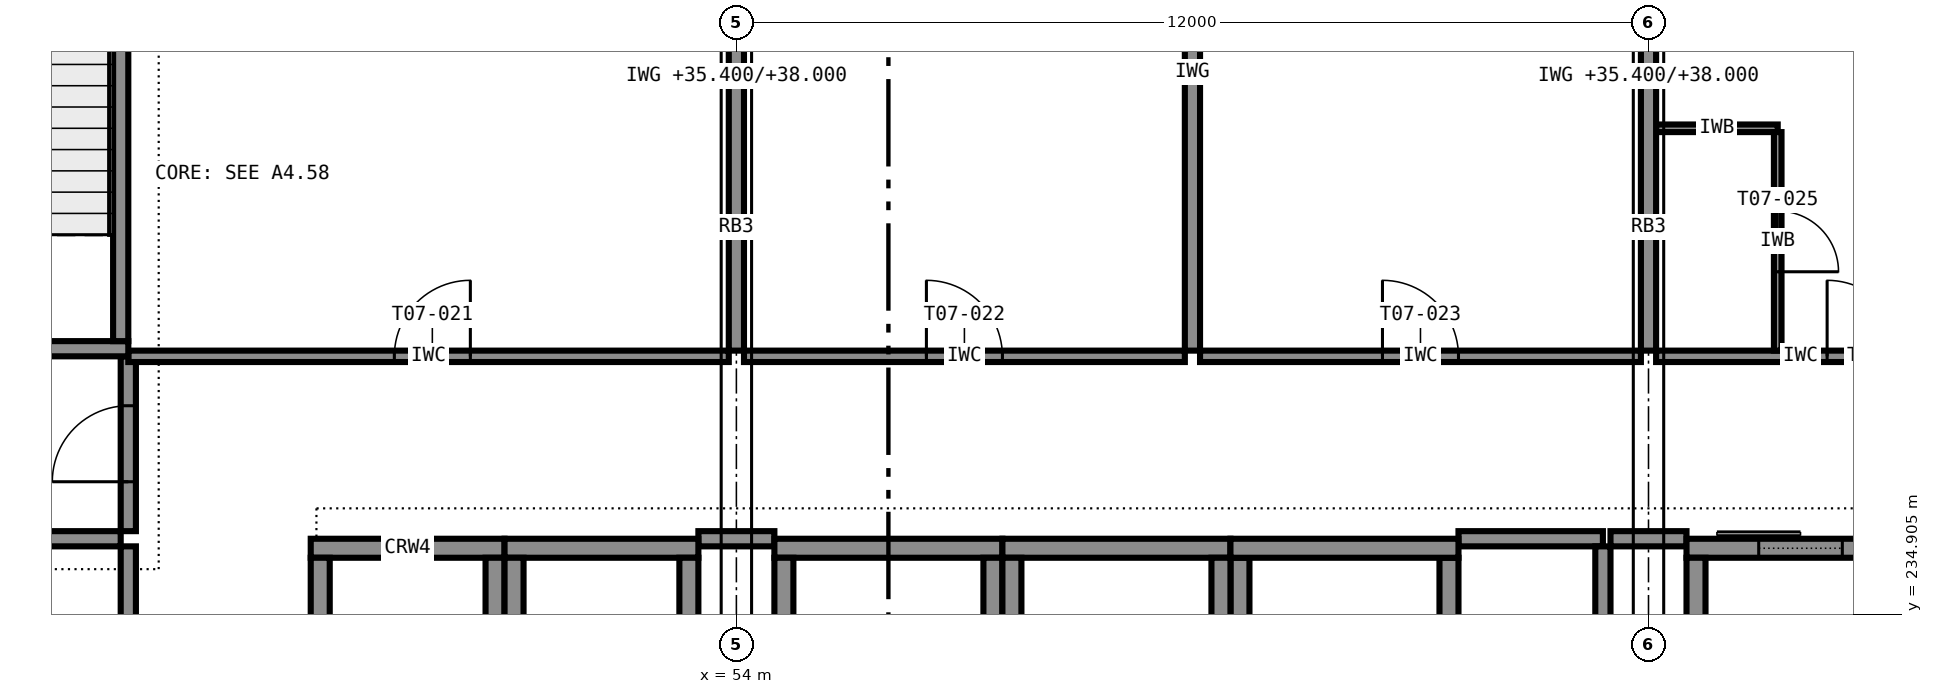
"""IFC4 building model, lengths in metres.
Left out: names, types, materials, properties, quantities, classifications, styles, units other than length and angle.
Written with IfcOpenShell. Run it as: python <this file> out.ifc"""

import sys

from ifc_helpers import new_model, si_unit, direction, frame, frame_2d, origin, place, context, subcontext, project, spatial, rectangle, extrude, element, fill, save


model = new_model("IFC4")
c1 = context("Model", 3, precision=1e-05, world=origin(), true_north=direction((0.0, 1.0)))
c2 = subcontext(c1, "Body", "Model", "MODEL_VIEW")
j1 = project(units=[si_unit("LENGTHUNIT", "METRE"), si_unit("PLANEANGLEUNIT", "RADIAN")], contexts=[c1])
p1 = place(None, origin())
s1 = spatial("IfcSite", under=j1, at=p1, CompositionType="ELEMENT")
p2 = place(p1, origin())
s2 = spatial("IfcBuilding", under=s1, at=p2, CompositionType="ELEMENT")
p3 = place(p2, frame((0.0, 0.0, 35.4)))
s3 = spatial("IfcBuildingStorey", under=s2, at=p3, CompositionType="ELEMENT", Elevation=35.4)
p4 = place(p3, frame((54.5, 235.775, 0.0), z_axis=(0.0, 0.0, 1.0), x_axis=(1.0, 0.0, 0.0)))
e1 = element("IfcWall", 1, at=p4, inside=s3, PredefinedType="SHEAR", context=c2, shape_type="SweptSolid", body=[
    extrude(rectangle(XDim=3.0, YDim=0.25, at=frame_2d((1.5, 0.0))), origin(), (0.0, 0.0, 1.0), 3.6),
])
for number, where, z_axis, x_axis in (
    (2, (54.625, 232.35, 0.0), (0.0, 0.0, 1.0), (0.0, 1.0, 0.0)),
    (3, (57.375, 232.35, 0.0), (0.0, 0.0, 1.0), (0.0, 1.0, 0.0)),
):
    element("IfcWall", number, at=place(p3, frame(where, z_axis=z_axis, x_axis=x_axis)), inside=s3, PredefinedType="SHEAR", context=c2, shape_type="SweptSolid", body=[
        extrude(rectangle(XDim=3.3, YDim=0.25, at=frame_2d((1.65, 0.0))), origin(), (0.0, 0.0, 1.0), 3.6),
    ])
p5 = place(p3, frame((57.5, 235.775, 0.0), z_axis=(0.0, 0.0, 1.0), x_axis=(1.0, 0.0, 0.0)))
e4 = element("IfcWall", 4, at=p5, inside=s3, PredefinedType="SHEAR", context=c2, shape_type="SweptSolid", body=[
    extrude(rectangle(XDim=3.0, YDim=0.25, at=frame_2d((1.5, 0.0))), origin(), (0.0, 0.0, 1.0), 3.6),
])
for number, where, z_axis, x_axis in (
    (5, (57.625, 232.35, 0.0), (0.0, 0.0, 1.0), (0.0, 1.0, 0.0)),
    (6, (60.375, 232.35, 0.0), (0.0, 0.0, 1.0), (0.0, 1.0, 0.0)),
):
    element("IfcWall", number, at=place(p3, frame(where, z_axis=z_axis, x_axis=x_axis)), inside=s3, PredefinedType="SHEAR", context=c2, shape_type="SweptSolid", body=[
        extrude(rectangle(XDim=3.3, YDim=0.25, at=frame_2d((1.65, 0.0))), origin(), (0.0, 0.0, 1.0), 3.6),
    ])
p6 = place(p3, frame((60.5, 235.775, 0.0), z_axis=(0.0, 0.0, 1.0), x_axis=(1.0, 0.0, 0.0)))
e7 = element("IfcWall", 7, at=p6, inside=s3, PredefinedType="SHEAR", context=c2, shape_type="SweptSolid", body=[
    extrude(rectangle(XDim=3.0, YDim=0.25, at=frame_2d((1.5, 0.0))), origin(), (0.0, 0.0, 1.0), 3.6),
])
for number, where, z_axis, x_axis in (
    (8, (60.625, 232.35, 0.0), (0.0, 0.0, 1.0), (0.0, 1.0, 0.0)),
    (9, (63.375, 232.35, 0.0), (0.0, 0.0, 1.0), (0.0, 1.0, 0.0)),
):
    element("IfcWall", number, at=place(p3, frame(where, z_axis=z_axis, x_axis=x_axis)), inside=s3, PredefinedType="SHEAR", context=c2, shape_type="SweptSolid", body=[
        extrude(rectangle(XDim=3.3, YDim=0.25, at=frame_2d((1.65, 0.0))), origin(), (0.0, 0.0, 1.0), 3.6),
    ])
p7 = place(p3, frame((66.5, 235.775, 0.0), z_axis=(0.0, 0.0, 1.0), x_axis=(1.0, 0.0, 0.0)))
e10 = element("IfcWall", 10, at=p7, inside=s3, PredefinedType="SHEAR", context=c2, shape_type="SweptSolid", body=[
    extrude(rectangle(XDim=3.0, YDim=0.25, at=frame_2d((1.5, 0.0))), origin(), (0.0, 0.0, 1.0), 3.6),
])
p8 = place(p7, frame((0.95, 0.0, 0.0)))
e11 = element("IfcOpeningElement", 11, at=p8, cuts=e10, PredefinedType="OPENING", context=c2, shape_type="SweptSolid", body=[
    extrude(rectangle(XDim=1.1, YDim=2.1, at=frame_2d((0.55, 1.05))), frame((0.0, 0.135, 0.0), z_axis=(0.0, -1.0, 0.0), x_axis=(1.0, 0.0, 0.0)), (0.0, 0.0, 1.0), 0.27),
])
p9 = place(p3, frame((66.625, 232.35, 0.0), z_axis=(0.0, 0.0, 1.0), x_axis=(0.0, 1.0, 0.0)))
e12 = element("IfcWall", 12, at=p9, inside=s3, PredefinedType="SHEAR", context=c2, shape_type="SweptSolid", body=[
    extrude(rectangle(XDim=3.3, YDim=0.25, at=frame_2d((1.65, 0.0))), origin(), (0.0, 0.0, 1.0), 3.6),
])
p10 = place(p3, frame((48.4, 235.775, 0.0), z_axis=(0.0, 0.0, 1.0), x_axis=(1.0, 0.0, 0.0)))
e13 = element("IfcWall", 13, at=p10, inside=s3, PredefinedType="SHEAR", context=c2, shape_type="SweptSolid", body=[
    extrude(rectangle(XDim=2.55, YDim=0.25, at=frame_2d((1.275, 0.0))), origin(), (0.0, 0.0, 1.0), 3.6),
])
for number, where, z_axis, x_axis in (
    (14, (48.525, 232.35, 0.0), (0.0, 0.0, 1.0), (0.0, 1.0, 0.0)),
    (15, (50.825, 232.35, 0.0), (0.0, 0.0, 1.0), (0.0, 1.0, 0.0)),
):
    element("IfcWall", number, at=place(p3, frame(where, z_axis=z_axis, x_axis=x_axis)), inside=s3, PredefinedType="SHEAR", context=c2, shape_type="SweptSolid", body=[
        extrude(rectangle(XDim=3.3, YDim=0.25, at=frame_2d((1.65, 0.0))), origin(), (0.0, 0.0, 1.0), 3.6),
    ])
p11 = place(p3, frame((50.95, 235.775, 0.0), z_axis=(0.0, 0.0, 1.0), x_axis=(1.0, 0.0, 0.0)))
e16 = element("IfcWall", 16, at=p11, inside=s3, PredefinedType="SHEAR", context=c2, shape_type="SweptSolid", body=[
    extrude(rectangle(XDim=2.55, YDim=0.25, at=frame_2d((1.275, 0.0))), origin(), (0.0, 0.0, 1.0), 3.6),
])
for number, where, z_axis, x_axis in (
    (17, (51.075, 232.35, 0.0), (0.0, 0.0, 1.0), (0.0, 1.0, 0.0)),
    (18, (53.375, 232.35, 0.0), (0.0, 0.0, 1.0), (0.0, 1.0, 0.0)),
):
    element("IfcWall", number, at=place(p3, frame(where, z_axis=z_axis, x_axis=x_axis)), inside=s3, PredefinedType="SHEAR", context=c2, shape_type="SweptSolid", body=[
        extrude(rectangle(XDim=3.3, YDim=0.25, at=frame_2d((1.65, 0.0))), origin(), (0.0, 0.0, 1.0), 3.6),
    ])
p12 = place(p3, frame((42.5, 238.4, 0.0), z_axis=(0.0, 0.0, 1.0), x_axis=(1.0, 0.0, 0.0)))
e19 = element("IfcWall", 19, at=p12, inside=s3, PredefinedType="SHEAR", context=c2, shape_type="SweptSolid", body=[
    extrude(rectangle(XDim=3.5, YDim=0.2, at=frame_2d((1.75, 0.0))), origin(), (0.0, 0.0, 1.0), 3.6),
])
p13 = place(p12, frame((1.15, 0.0, 0.0)))
e20 = element("IfcOpeningElement", 20, at=p13, cuts=e19, PredefinedType="OPENING", context=c2, shape_type="SweptSolid", body=[
    extrude(rectangle(XDim=1.2, YDim=2.1, at=frame_2d((0.6, 1.05))), frame((0.0, 0.11, 0.0), z_axis=(0.0, -1.0, 0.0), x_axis=(1.0, 0.0, 0.0)), (0.0, 0.0, 1.0), 0.22),
])
p14 = place(p3, frame((45.9, 238.5, 0.0), z_axis=(0.0, 0.0, 1.0), x_axis=(0.0, 1.0, 0.0)))
e21 = element("IfcWall", 21, at=p14, inside=s3, PredefinedType="SHEAR", context=c2, shape_type="SweptSolid", body=[
    extrude(rectangle(XDim=7.0, YDim=0.2, at=frame_2d((3.5, 0.0))), origin(), (0.0, 0.0, 1.0), 3.6),
])
p15 = place(p3, frame((42.3, 235.9, 0.0), z_axis=(0.0, 0.0, 1.0), x_axis=(1.0, 0.0, 0.0)))
e22 = element("IfcWall", 22, at=p15, inside=s3, PredefinedType="PARTITIONING", context=c2, shape_type="SweptSolid", body=[
    extrude(rectangle(XDim=3.6, YDim=0.2, at=frame_2d((1.8, 0.0))), origin(), (0.0, 0.0, 1.0), 3.4),
])
p16 = place(p3, frame((53.5, 235.9, 0.0), z_axis=(0.0, 0.0, 1.0), x_axis=(1.0, 0.0, 0.0)))
e23 = element("IfcWall", 23, at=p16, inside=s3, PredefinedType="PARTITIONING", context=c2, shape_type="SweptSolid", body=[
    extrude(rectangle(XDim=1.0, YDim=0.2, at=frame_2d((0.5, 0.0))), origin(), (0.0, 0.0, 1.0), 3.4),
])
p17 = place(p3, frame((63.5, 235.9, 0.0), z_axis=(0.0, 0.0, 1.0), x_axis=(1.0, 0.0, 0.0)))
e24 = element("IfcWall", 24, at=p17, inside=s3, PredefinedType="PARTITIONING", context=c2, shape_type="SweptSolid", body=[
    extrude(rectangle(XDim=1.9, YDim=0.2, at=frame_2d((0.95, 0.0))), origin(), (0.0, 0.0, 1.0), 3.4),
])
p18 = place(p3, frame((65.5, 235.9, 0.0), z_axis=(0.0, 0.0, 1.0), x_axis=(1.0, 0.0, 0.0)))
e25 = element("IfcWall", 25, at=p18, inside=s3, PredefinedType="PARTITIONING", context=c2, shape_type="SweptSolid", body=[
    extrude(rectangle(XDim=1.0, YDim=0.2, at=frame_2d((0.5, 0.0))), origin(), (0.0, 0.0, 1.0), 3.4),
])
p19 = place(p3, frame((46.0, 232.2, 0.0), z_axis=(0.0, 0.0, 1.0), x_axis=(0.0, 1.0, 0.0)))
e26 = element("IfcWall", 26, at=p19, inside=s3, PredefinedType="PARTITIONING", context=c2, shape_type="SweptSolid", body=[
    extrude(rectangle(XDim=3.6, YDim=0.2, at=frame_2d((1.8, 0.0))), origin(), (0.0, 0.0, 1.0), 3.4),
])
p20 = place(p19, frame((1.35, 0.0, 0.0)))
e27 = element("IfcOpeningElement", 27, at=p20, cuts=e26, PredefinedType="OPENING", context=c2, shape_type="SweptSolid", body=[
    extrude(rectangle(XDim=0.9, YDim=2.1, at=frame_2d((0.45, 1.05))), frame((0.0, 0.11, 0.0), z_axis=(0.0, -1.0, 0.0), x_axis=(1.0, 0.0, 0.0)), (0.0, 0.0, 1.0), 0.22),
])
p21 = place(p3, frame((46.0, 236.0, 0.0), z_axis=(0.0, 0.0, 1.0), x_axis=(0.0, 1.0, 0.0)))
e28 = element("IfcWall", 28, at=p21, inside=s3, PredefinedType="PARTITIONING", context=c2, shape_type="SweptSolid", body=[
    extrude(rectangle(XDim=2.3, YDim=0.2, at=frame_2d((1.15, 0.0))), origin(), (0.0, 0.0, 1.0), 3.4),
])
p22 = place(p21, frame((0.65, 0.0, 0.0)))
e29 = element("IfcOpeningElement", 29, at=p22, cuts=e28, PredefinedType="OPENING", context=c2, shape_type="SweptSolid", body=[
    extrude(rectangle(XDim=1.0, YDim=2.1, at=frame_2d((0.5, 1.05))), frame((0.0, 0.11, 0.0), z_axis=(0.0, -1.0, 0.0), x_axis=(1.0, 0.0, 0.0)), (0.0, 0.0, 1.0), 0.22),
])
p23 = place(p3, frame((65.4, 232.2, 0.0), z_axis=(0.0, 0.0, 1.0), x_axis=(0.0, 1.0, 0.0)))
e30 = element("IfcWall", 30, at=p23, inside=s3, PredefinedType="PARTITIONING", context=c2, shape_type="SweptSolid", body=[
    extrude(rectangle(XDim=3.6, YDim=0.2, at=frame_2d((1.8, 0.0))), origin(), (0.0, 0.0, 1.0), 3.4),
])
p24 = place(p3, frame((46.0, 238.3, 0.0), z_axis=(0.0, 0.0, 1.0), x_axis=(1.0, 0.0, 0.0)))
e31 = element("IfcWall", 31, at=p24, inside=s3, PredefinedType="PARTITIONING", context=c2, shape_type="SweptSolid", body=[
    extrude(rectangle(XDim=7.9, YDim=0.15, at=frame_2d((3.95, 0.0))), origin(), (0.0, 0.0, 1.0), 3.4),
])
p25 = place(p24, frame((3.5, 0.0, 0.0)))
e32 = element("IfcOpeningElement", 32, at=p25, cuts=e31, PredefinedType="OPENING", context=c2, shape_type="SweptSolid", body=[
    extrude(rectangle(XDim=1.0, YDim=2.1, at=frame_2d((0.5, 1.05))), frame((0.0, 0.085, 0.0), z_axis=(0.0, -1.0, 0.0), x_axis=(1.0, 0.0, 0.0)), (0.0, 0.0, 1.0), 0.17),
])
p26 = place(p3, frame((54.1, 238.3, 0.0), z_axis=(0.0, 0.0, 1.0), x_axis=(1.0, 0.0, 0.0)))
e33 = element("IfcWall", 33, at=p26, inside=s3, PredefinedType="PARTITIONING", context=c2, shape_type="SweptSolid", body=[
    extrude(rectangle(XDim=5.8, YDim=0.15, at=frame_2d((2.9, 0.0))), origin(), (0.0, 0.0, 1.0), 3.4),
])
p27 = place(p26, frame((2.4, 0.0, 0.0)))
e34 = element("IfcOpeningElement", 34, at=p27, cuts=e33, PredefinedType="OPENING", context=c2, shape_type="SweptSolid", body=[
    extrude(rectangle(XDim=1.0, YDim=2.1, at=frame_2d((0.5, 1.05))), frame((0.0, 0.085, 0.0), z_axis=(0.0, -1.0, 0.0), x_axis=(1.0, 0.0, 0.0)), (0.0, 0.0, 1.0), 0.17),
])
p28 = place(p3, frame((60.1, 238.3, 0.0), z_axis=(0.0, 0.0, 1.0), x_axis=(1.0, 0.0, 0.0)))
e35 = element("IfcWall", 35, at=p28, inside=s3, PredefinedType="PARTITIONING", context=c2, shape_type="SweptSolid", body=[
    extrude(rectangle(XDim=5.8, YDim=0.15, at=frame_2d((2.9, 0.0))), origin(), (0.0, 0.0, 1.0), 3.4),
])
p29 = place(p28, frame((2.4, 0.0, 0.0)))
e36 = element("IfcOpeningElement", 36, at=p29, cuts=e35, PredefinedType="OPENING", context=c2, shape_type="SweptSolid", body=[
    extrude(rectangle(XDim=1.0, YDim=2.1, at=frame_2d((0.5, 1.05))), frame((0.0, 0.085, 0.0), z_axis=(0.0, -1.0, 0.0), x_axis=(1.0, 0.0, 0.0)), (0.0, 0.0, 1.0), 0.17),
])
p30 = place(p3, frame((66.1, 238.3, 0.0), z_axis=(0.0, 0.0, 1.0), x_axis=(1.0, 0.0, 0.0)))
e37 = element("IfcWall", 37, at=p30, inside=s3, PredefinedType="PARTITIONING", context=c2, shape_type="SweptSolid", body=[
    extrude(rectangle(XDim=3.8, YDim=0.15, at=frame_2d((1.9, 0.0))), origin(), (0.0, 0.0, 1.0), 3.4),
])
p31 = place(p30, frame((2.25, 0.0, 0.0)))
e38 = element("IfcOpeningElement", 38, at=p31, cuts=e37, PredefinedType="OPENING", context=c2, shape_type="SweptSolid", body=[
    extrude(rectangle(XDim=1.0, YDim=2.1, at=frame_2d((0.5, 1.05))), frame((0.0, 0.085, 0.0), z_axis=(0.0, -1.0, 0.0), x_axis=(1.0, 0.0, 0.0)), (0.0, 0.0, 1.0), 0.17),
])
p32 = place(p3, frame((66.1, 241.3, 0.0), z_axis=(0.0, 0.0, 1.0), x_axis=(1.0, 0.0, 0.0)))
e39 = element("IfcWall", 39, at=p32, inside=s3, PredefinedType="PARTITIONING", context=c2, shape_type="SweptSolid", body=[
    extrude(rectangle(XDim=1.6, YDim=0.1, at=frame_2d((0.8, 0.0))), origin(), (0.0, 0.0, 1.0), 3.4),
])
p33 = place(p3, frame((67.7, 241.25, 0.0), z_axis=(0.0, 0.0, 1.0), x_axis=(0.0, -1.0, 0.0)))
e40 = element("IfcWall", 40, at=p33, inside=s3, PredefinedType="PARTITIONING", context=c2, shape_type="SweptSolid", body=[
    extrude(rectangle(XDim=2.875, YDim=0.1, at=frame_2d((1.438, 0.0))), origin(), (0.0, 0.0, 1.0), 3.4),
])
p34 = place(p33, frame((1.038, 0.0, 0.0)))
e41 = element("IfcOpeningElement", 41, at=p34, cuts=e40, PredefinedType="OPENING", context=c2, shape_type="SweptSolid", body=[
    extrude(rectangle(XDim=0.8, YDim=2.1, at=frame_2d((0.4, 1.05))), frame((0.0, 0.06, 0.0), z_axis=(0.0, -1.0, 0.0), x_axis=(1.0, 0.0, 0.0)), (0.0, 0.0, 1.0), 0.12),
])
p35 = place(p3, frame((54.0, 245.6, 0.0), z_axis=(0.0, 0.0, 1.0), x_axis=(0.0, -1.0, 0.0)))
e42 = element("IfcWall", 42, at=p35, inside=s3, PredefinedType="PARTITIONING", context=c2, shape_type="SweptSolid", body=[
    extrude(rectangle(XDim=7.225, YDim=0.2, at=frame_2d((3.613, 0.0))), origin(), (0.0, 0.0, 1.0), 2.6),
])
p36 = place(p3, frame((60.0, 245.7, 0.0), z_axis=(0.0, 0.0, 1.0), x_axis=(0.0, -1.0, 0.0)))
e43 = element("IfcWall", 43, at=p36, inside=s3, PredefinedType="PARTITIONING", context=c2, shape_type="SweptSolid", body=[
    extrude(rectangle(XDim=7.325, YDim=0.2, at=frame_2d((3.663, 0.0))), origin(), (0.0, 0.0, 1.0), 3.4),
])
p37 = place(p3, frame((66.0, 245.6, 0.0), z_axis=(0.0, 0.0, 1.0), x_axis=(0.0, -1.0, 0.0)))
e44 = element("IfcWall", 44, at=p37, inside=s3, PredefinedType="PARTITIONING", context=c2, shape_type="SweptSolid", body=[
    extrude(rectangle(XDim=7.225, YDim=0.2, at=frame_2d((3.613, 0.0))), origin(), (0.0, 0.0, 1.0), 2.6),
])
p38 = place(p22, origin())
e45 = element("IfcDoor", 45, at=p38, inside=s3, OperationType="SINGLE_SWING_LEFT", PredefinedType="DOOR", context=c2, shape_type="SweptSolid", body=[
    extrude(rectangle(XDim=1.0, YDim=2.1, at=frame_2d((0.5, 1.05))), frame((0.0, 0.025, 0.0), z_axis=(0.0, -1.0, 0.0), x_axis=(1.0, 0.0, 0.0)), (0.0, 0.0, 1.0), 0.05),
])
fill(e29, e45)
p39 = place(p25, origin())
e46 = element("IfcDoor", 46, at=p39, inside=s3, OperationType="SINGLE_SWING_RIGHT", PredefinedType="DOOR", context=c2, shape_type="SweptSolid", body=[
    extrude(rectangle(XDim=1.0, YDim=2.1, at=frame_2d((0.5, 1.05))), frame((0.0, 0.025, 0.0), z_axis=(0.0, -1.0, 0.0), x_axis=(1.0, 0.0, 0.0)), (0.0, 0.0, 1.0), 0.05),
])
fill(e32, e46)
p40 = place(p27, origin())
e47 = element("IfcDoor", 47, at=p40, inside=s3, OperationType="SINGLE_SWING_LEFT", PredefinedType="DOOR", context=c2, shape_type="SweptSolid", body=[
    extrude(rectangle(XDim=1.0, YDim=2.1, at=frame_2d((0.5, 1.05))), frame((0.0, 0.025, 0.0), z_axis=(0.0, -1.0, 0.0), x_axis=(1.0, 0.0, 0.0)), (0.0, 0.0, 1.0), 0.05),
])
fill(e34, e47)
p41 = place(p29, origin())
e48 = element("IfcDoor", 48, at=p41, inside=s3, OperationType="SINGLE_SWING_LEFT", PredefinedType="DOOR", context=c2, shape_type="SweptSolid", body=[
    extrude(rectangle(XDim=1.0, YDim=2.1, at=frame_2d((0.5, 1.05))), frame((0.0, 0.025, 0.0), z_axis=(0.0, -1.0, 0.0), x_axis=(1.0, 0.0, 0.0)), (0.0, 0.0, 1.0), 0.05),
])
fill(e36, e48)
p42 = place(p31, origin())
e49 = element("IfcDoor", 49, at=p42, inside=s3, OperationType="SINGLE_SWING_LEFT", PredefinedType="DOOR", context=c2, shape_type="SweptSolid", body=[
    extrude(rectangle(XDim=1.0, YDim=2.1, at=frame_2d((0.5, 1.05))), frame((0.0, 0.025, 0.0), z_axis=(0.0, -1.0, 0.0), x_axis=(1.0, 0.0, 0.0)), (0.0, 0.0, 1.0), 0.05),
])
fill(e38, e49)
p43 = place(p34, origin())
e50 = element("IfcDoor", 50, at=p43, inside=s3, OperationType="SINGLE_SWING_RIGHT", PredefinedType="DOOR", context=c2, shape_type="SweptSolid", body=[
    extrude(rectangle(XDim=0.8, YDim=2.1, at=frame_2d((0.4, 1.05))), frame((0.0, 0.025, 0.0), z_axis=(0.0, -1.0, 0.0), x_axis=(1.0, 0.0, 0.0)), (0.0, 0.0, 1.0), 0.05),
])
fill(e41, e50)
p44 = place(p8, origin())
e51 = element("IfcDoor", 51, at=p44, inside=s3, OperationType="SLIDING_TO_LEFT", PredefinedType="DOOR", context=c2, shape_type="SweptSolid", body=[
    extrude(rectangle(XDim=1.1, YDim=2.1, at=frame_2d((0.55, 1.05))), frame((0.0, 0.025, 0.0), z_axis=(0.0, -1.0, 0.0), x_axis=(1.0, 0.0, 0.0)), (0.0, 0.0, 1.0), 0.05),
])
fill(e11, e51)
save(model, sys.argv[1])
